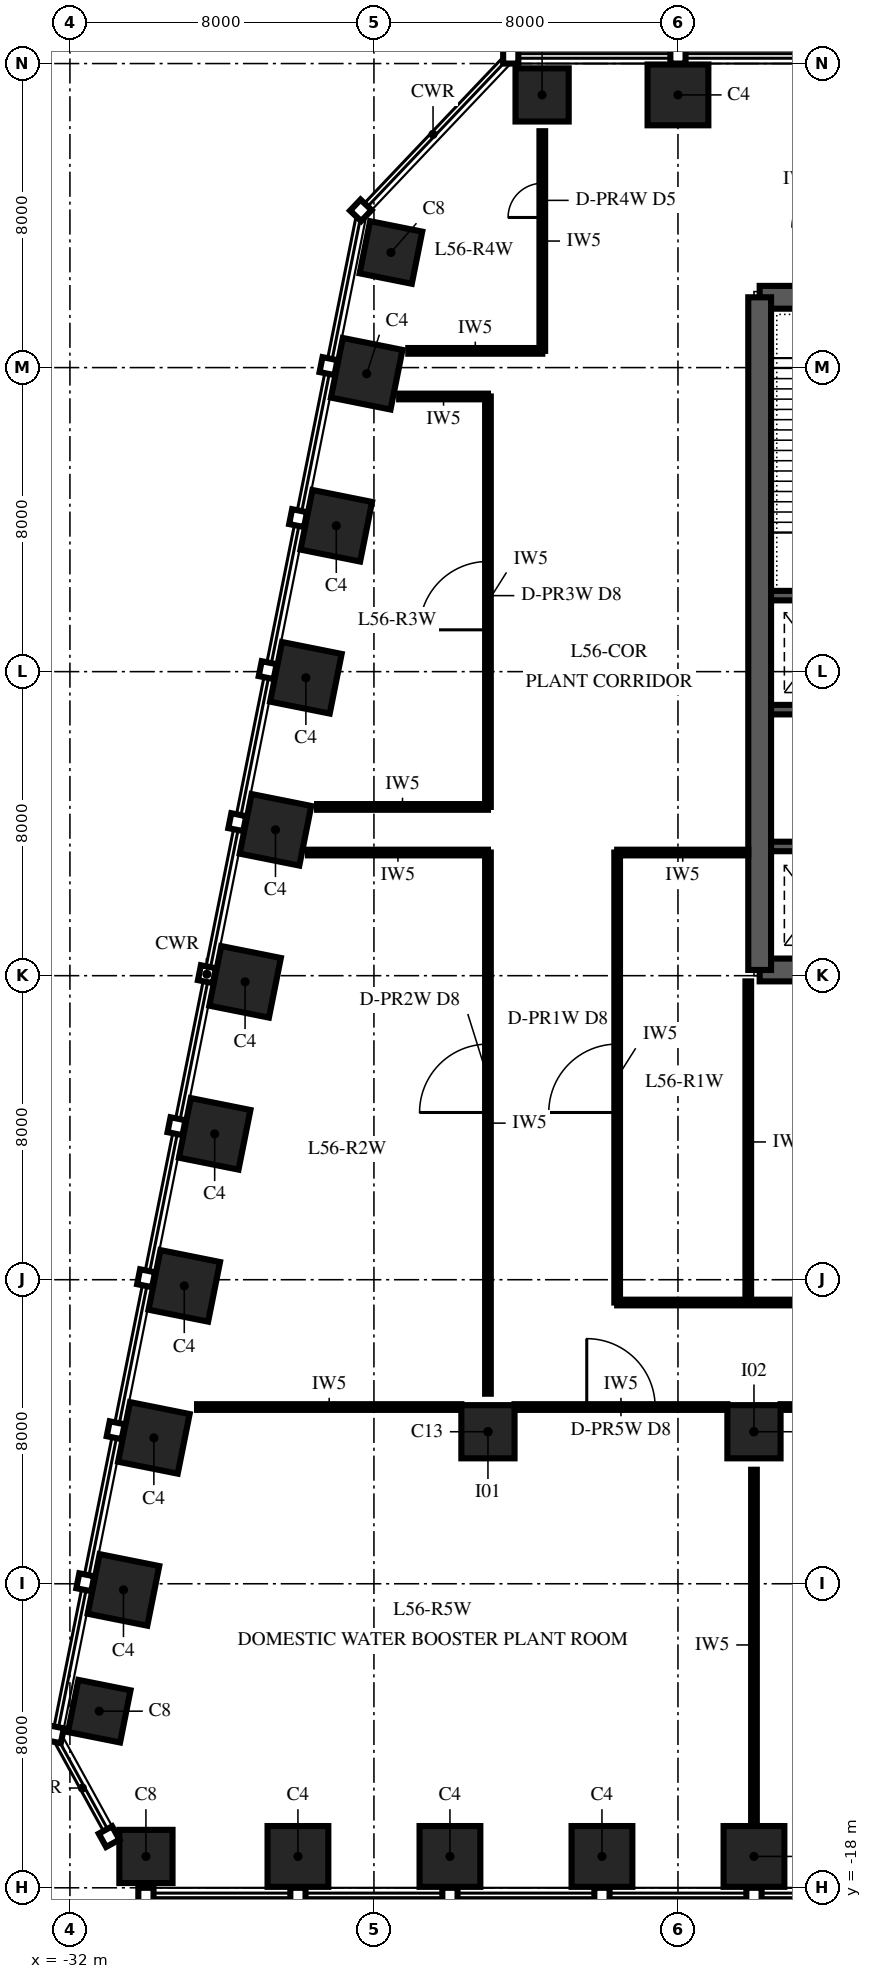
"""IFC4 building model, lengths in metres.
Left out: names, types, materials, properties, quantities, classifications, styles, units other than length and angle.
Written with IfcOpenShell. Run it as: python <this file> out.ifc"""

import sys

from ifc_helpers import new_model, si_unit, direction, frame, frame_2d, origin, origin_2d, place, context, subcontext, project, spatial, polyline, rectangle, outline, extrude, element, fill, save


model = new_model("IFC4")
c1 = context("Model", 3, precision=1e-05, world=origin(), true_north=direction((0.0, 1.0)))
c2 = subcontext(c1, "Body", "Model", "MODEL_VIEW")
j1 = project(units=[si_unit("LENGTHUNIT", "METRE"), si_unit("PLANEANGLEUNIT", "RADIAN")], contexts=[c1])
p1 = place(None, origin())
s1 = spatial("IfcSite", under=j1, at=p1, CompositionType="ELEMENT")
p2 = place(p1, origin())
s2 = spatial("IfcBuilding", under=s1, at=p2, CompositionType="ELEMENT")
p3 = place(p2, frame((0.0, 0.0, 242.0)))
s3 = spatial("IfcBuildingStorey", under=s2, at=p3, CompositionType="ELEMENT", Elevation=242.0)
p4 = place(p3, frame((-30.0, -17.175, 0.0), z_axis=(0.0, 0.0, 1.0), x_axis=(1.0, 0.0, 0.0)))
e1 = element("IfcColumn", 1, at=p4, inside=s3, PredefinedType="COLUMN", context=c2, shape_type="SweptSolid", body=[
    extrude(rectangle(XDim=1.4, YDim=1.4, at=origin_2d()), origin(), (0.0, 0.0, 1.0), 6.0),
])
for number, where, z_axis, x_axis in (
    (2, (-26.0, -17.175, 0.0), (0.0, 0.0, 1.0), (1.0, 0.0, 0.0)),
    (3, (-22.0, -17.175, 0.0), (0.0, 0.0, 1.0), (1.0, 0.0, 0.0)),
    (4, (-18.0, -17.175, 0.0), (0.0, 0.0, 1.0), (1.0, 0.0, 0.0)),
    (5, (-14.0, -17.175, 0.0), (0.0, 0.0, 1.0), (1.0, 0.0, 0.0)),
    (6, (-16.0, 29.175, 0.0), (0.0, 0.0, 1.0), (-1.0, 0.0, 0.0)),
):
    element("IfcColumn", number, at=place(p3, frame(where, z_axis=z_axis, x_axis=x_axis)), inside=s3, PredefinedType="COLUMN", context=c2, shape_type="SweptSolid", body=[
        extrude(rectangle(XDim=1.6, YDim=1.6, at=origin_2d()), origin(), (0.0, 0.0, 1.0), 6.0),
    ])
for number, where, z_axis, x_axis in (
    (7, (-19.575, 29.175, 0.0), (0.0, 0.0, 1.0), (-1.0, 0.0, 0.0)),
    (8, (-23.553, 25.029, 0.0), (0.0, 0.0, 1.0), (-0.196, -0.981, 0.0)),
):
    element("IfcColumn", number, at=place(p3, frame(where, z_axis=z_axis, x_axis=x_axis)), inside=s3, PredefinedType="COLUMN", context=c2, shape_type="SweptSolid", body=[
        extrude(rectangle(XDim=1.4, YDim=1.4, at=origin_2d()), origin(), (0.0, 0.0, 1.0), 6.0),
    ])
for number, where, z_axis, x_axis in (
    (9, (-24.191, 21.838, 0.0), (0.0, 0.0, 1.0), (-0.196, -0.981, 0.0)),
    (10, (-24.991, 17.838, 0.0), (0.0, 0.0, 1.0), (-0.196, -0.981, 0.0)),
    (11, (-25.791, 13.838, 0.0), (0.0, 0.0, 1.0), (-0.196, -0.981, 0.0)),
    (12, (-26.591, 9.838, 0.0), (0.0, 0.0, 1.0), (-0.196, -0.981, 0.0)),
    (13, (-27.391, 5.838, 0.0), (0.0, 0.0, 1.0), (-0.196, -0.981, 0.0)),
    (14, (-28.191, 1.838, 0.0), (0.0, 0.0, 1.0), (-0.196, -0.981, 0.0)),
    (15, (-28.991, -2.162, 0.0), (0.0, 0.0, 1.0), (-0.196, -0.981, 0.0)),
    (16, (-29.791, -6.162, 0.0), (0.0, 0.0, 1.0), (-0.196, -0.981, 0.0)),
    (17, (-30.591, -10.162, 0.0), (0.0, 0.0, 1.0), (-0.196, -0.981, 0.0)),
):
    element("IfcColumn", number, at=place(p3, frame(where, z_axis=z_axis, x_axis=x_axis)), inside=s3, PredefinedType="COLUMN", context=c2, shape_type="SweptSolid", body=[
        extrude(rectangle(XDim=1.6, YDim=1.6, at=origin_2d()), origin(), (0.0, 0.0, 1.0), 6.0),
    ])
for number, where, z_axis, x_axis in (
    (18, (-31.229, -13.353, 0.0), (0.0, 0.0, 1.0), (-0.196, -0.981, 0.0)),
    (19, (-21.0, -6.0, 0.0), (0.0, 0.0, 1.0), (1.0, 0.0, 0.0)),
    (20, (-14.0, -6.0, 0.0), (0.0, 0.0, 1.0), (1.0, 0.0, 0.0)),
):
    element("IfcColumn", number, at=place(p3, frame(where, z_axis=z_axis, x_axis=x_axis)), inside=s3, PredefinedType="COLUMN", context=c2, shape_type="SweptSolid", body=[
        extrude(rectangle(XDim=1.4, YDim=1.4, at=origin_2d()), origin(), (0.0, 0.0, 1.0), 6.0),
    ])
p5 = place(p3, frame((-13.85, 6.15, 0.0), z_axis=(0.0, 0.0, 1.0), x_axis=(1.0, 0.0, 0.0)))
e21 = element("IfcWall", 21, at=p5, inside=s3, PredefinedType="SHEAR", context=c2, shape_type="SweptSolid", body=[
    extrude(rectangle(XDim=27.7, YDim=0.6, at=frame_2d((13.85, 0.0))), origin(), (0.0, 0.0, 1.0), 6.0),
])
p6 = place(p3, frame((13.85, 23.85, 0.0), z_axis=(0.0, 0.0, 1.0), x_axis=(-1.0, 0.0, 0.0)))
e22 = element("IfcWall", 22, at=p6, inside=s3, PredefinedType="SHEAR", context=c2, shape_type="SweptSolid", body=[
    extrude(rectangle(XDim=27.7, YDim=0.6, at=frame_2d((13.85, 0.0))), origin(), (0.0, 0.0, 1.0), 6.0),
])
p7 = place(p6, frame((21.75, 0.0, 0.0)))
e23 = element("IfcOpeningElement", 23, at=p7, cuts=e22, PredefinedType="OPENING", context=c2, shape_type="SweptSolid", body=[
    extrude(rectangle(XDim=1.0, YDim=2.1, at=frame_2d((0.5, 1.05))), frame((0.0, 0.315, 0.0), z_axis=(0.0, -1.0, 0.0), x_axis=(1.0, 0.0, 0.0)), (0.0, 0.0, 1.0), 0.63),
])
p8 = place(p6, frame((4.95, 0.0, 0.0)))
e24 = element("IfcOpeningElement", 24, at=p8, cuts=e22, PredefinedType="OPENING", context=c2, shape_type="SweptSolid", body=[
    extrude(rectangle(XDim=1.0, YDim=2.1, at=frame_2d((0.5, 1.05))), frame((0.0, 0.315, 0.0), z_axis=(0.0, -1.0, 0.0), x_axis=(1.0, 0.0, 0.0)), (0.0, 0.0, 1.0), 0.63),
])
p9 = place(p6, frame((17.35, 0.0, 0.0)))
e25 = element("IfcOpeningElement", 25, at=p9, cuts=e22, PredefinedType="OPENING", context=c2, shape_type="SweptSolid", body=[
    extrude(rectangle(XDim=1.0, YDim=2.1, at=frame_2d((0.5, 1.05))), frame((0.0, 0.315, 0.0), z_axis=(0.0, -1.0, 0.0), x_axis=(1.0, 0.0, 0.0)), (0.0, 0.0, 1.0), 0.63),
])
p10 = place(p6, frame((13.35, 0.0, 0.0)))
e26 = element("IfcOpeningElement", 26, at=p10, cuts=e22, PredefinedType="OPENING", context=c2, shape_type="SweptSolid", body=[
    extrude(rectangle(XDim=1.0, YDim=2.1, at=frame_2d((0.5, 1.05))), frame((0.0, 0.315, 0.0), z_axis=(0.0, -1.0, 0.0), x_axis=(1.0, 0.0, 0.0)), (0.0, 0.0, 1.0), 0.63),
])
p11 = place(p6, frame((9.35, 0.0, 0.0)))
e27 = element("IfcOpeningElement", 27, at=p11, cuts=e22, PredefinedType="OPENING", context=c2, shape_type="SweptSolid", body=[
    extrude(rectangle(XDim=1.0, YDim=2.1, at=frame_2d((0.5, 1.05))), frame((0.0, 0.315, 0.0), z_axis=(0.0, -1.0, 0.0), x_axis=(1.0, 0.0, 0.0)), (0.0, 0.0, 1.0), 0.63),
])
p12 = place(p3, frame((-13.85, 23.85, 0.0), z_axis=(0.0, 0.0, 1.0), x_axis=(0.0, -1.0, 0.0)))
e28 = element("IfcWall", 28, at=p12, inside=s3, PredefinedType="SHEAR", context=c2, shape_type="SweptSolid", body=[
    extrude(outline(polyline([(0.0, -0.3), (17.7, -0.3), (17.7, 0.0), (17.4, 0.0), (17.4, 0.3), (0.3, 0.3), (0.3, 0.0), (0.0, 0.0), (0.0, -0.3)])), origin(), (0.0, 0.0, 1.0), 6.0),
])
for number, where, z_axis, x_axis in (
    (29, (-13.55, 9.4, 0.0), (0.0, 0.0, 1.0), (1.0, 0.0, 0.0)),
    (30, (-13.55, 13.0, 0.0), (0.0, 0.0, 1.0), (1.0, 0.0, 0.0)),
    (31, (-13.55, 16.0, 0.0), (0.0, 0.0, 1.0), (1.0, 0.0, 0.0)),
):
    element("IfcWall", number, at=place(p3, frame(where, z_axis=z_axis, x_axis=x_axis)), inside=s3, PredefinedType="SHEAR", context=c2, shape_type="SweptSolid", body=[
        extrude(rectangle(XDim=27.1, YDim=0.25, at=frame_2d((13.55, 0.0))), origin(), (0.0, 0.0, 1.0), 6.0),
    ])
p13 = place(p3, frame((-17.6, -2.6, 0.0), z_axis=(0.0, 0.0, 1.0), x_axis=(0.0, 1.0, 0.0)))
e32 = element("IfcWall", 32, at=p13, inside=s3, PredefinedType="PARTITIONING", context=c2, shape_type="SweptSolid", body=[
    extrude(rectangle(XDim=11.84, YDim=0.15, at=frame_2d((5.92, 0.0))), origin(), (0.0, 0.0, 1.0), 5.85),
])
p14 = place(p13, frame((5.0, 0.0, 0.0)))
e33 = element("IfcOpeningElement", 33, at=p14, cuts=e32, PredefinedType="OPENING", context=c2, shape_type="SweptSolid", body=[
    extrude(rectangle(XDim=1.8, YDim=2.4, at=frame_2d((0.9, 1.2))), frame((0.0, 0.09, 0.0), z_axis=(0.0, -1.0, 0.0), x_axis=(1.0, 0.0, 0.0)), (0.0, 0.0, 1.0), 0.18),
])
p15 = place(p3, frame((-21.0, -5.0, 0.0), z_axis=(0.0, 0.0, 1.0), x_axis=(0.0, 1.0, 0.0)))
e34 = element("IfcWall", 34, at=p15, inside=s3, PredefinedType="PARTITIONING", context=c2, shape_type="SweptSolid", body=[
    extrude(rectangle(XDim=14.24, YDim=0.15, at=frame_2d((7.12, 0.0))), origin(), (0.0, 0.0, 1.0), 5.85),
])
p16 = place(p15, frame((7.4, 0.0, 0.0)))
e35 = element("IfcOpeningElement", 35, at=p16, cuts=e34, PredefinedType="OPENING", context=c2, shape_type="SweptSolid", body=[
    extrude(rectangle(XDim=1.8, YDim=2.4, at=frame_2d((0.9, 1.2))), frame((0.0, 0.09, 0.0), z_axis=(0.0, -1.0, 0.0), x_axis=(1.0, 0.0, 0.0)), (0.0, 0.0, 1.0), 0.18),
])
p17 = place(p3, frame((-21.0, 10.44, 0.0), z_axis=(0.0, 0.0, 1.0), x_axis=(0.0, 1.0, 0.0)))
e36 = element("IfcWall", 36, at=p17, inside=s3, PredefinedType="PARTITIONING", context=c2, shape_type="SweptSolid", body=[
    extrude(rectangle(XDim=10.8, YDim=0.15, at=frame_2d((5.4, 0.0))), origin(), (0.0, 0.0, 1.0), 5.85),
])
p18 = place(p17, frame((4.66, 0.0, 0.0)))
e37 = element("IfcOpeningElement", 37, at=p18, cuts=e36, PredefinedType="OPENING", context=c2, shape_type="SweptSolid", body=[
    extrude(rectangle(XDim=1.8, YDim=2.4, at=frame_2d((0.9, 1.2))), frame((0.0, 0.09, 0.0), z_axis=(0.0, -1.0, 0.0), x_axis=(1.0, 0.0, 0.0)), (0.0, 0.0, 1.0), 0.18),
])
p19 = place(p3, frame((-14.15, -2.6, 0.0), z_axis=(0.0, 0.0, 1.0), x_axis=(0.0, 1.0, 0.0)))
e38 = element("IfcWall", 38, at=p19, inside=s3, PredefinedType="PARTITIONING", context=c2, shape_type="SweptSolid", body=[
    extrude(rectangle(XDim=8.45, YDim=0.15, at=frame_2d((4.225, 0.0))), origin(), (0.0, 0.0, 1.0), 5.85),
])
p20 = place(p3, frame((-14.15, 9.24, 0.0), z_axis=(0.0, 0.0, 1.0), x_axis=(-1.0, 0.0, 0.0)))
e39 = element("IfcWall", 39, at=p20, inside=s3, PredefinedType="PARTITIONING", context=c2, shape_type="SweptSolid", body=[
    extrude(rectangle(XDim=3.45, YDim=0.15, at=frame_2d((1.725, 0.0))), origin(), (0.0, 0.0, 1.0), 5.25),
])
p21 = place(p3, frame((-21.0, 9.24, 0.0), z_axis=(0.0, 0.0, 1.0), x_axis=(-1.0, 0.0, 0.0)))
e40 = element("IfcWall", 40, at=p21, inside=s3, PredefinedType="PARTITIONING", context=c2, shape_type="SweptSolid", body=[
    extrude(rectangle(XDim=4.737, YDim=0.15, at=frame_2d((2.368, 0.0))), origin(), (0.0, 0.0, 1.0), 5.85),
])
p22 = place(p3, frame((-21.0, 10.44, 0.0), z_axis=(0.0, 0.0, 1.0), x_axis=(-1.0, 0.0, 0.0)))
e41 = element("IfcWall", 41, at=p22, inside=s3, PredefinedType="PARTITIONING", context=c2, shape_type="SweptSolid", body=[
    extrude(rectangle(XDim=4.497, YDim=0.15, at=frame_2d((2.248, 0.0))), origin(), (0.0, 0.0, 1.0), 5.85),
])
p23 = place(p3, frame((-21.0, 21.24, 0.0), z_axis=(0.0, 0.0, 1.0), x_axis=(-1.0, 0.0, 0.0)))
e42 = element("IfcWall", 42, at=p23, inside=s3, PredefinedType="PARTITIONING", context=c2, shape_type="SweptSolid", body=[
    extrude(rectangle(XDim=2.337, YDim=0.15, at=frame_2d((1.168, 0.0))), origin(), (0.0, 0.0, 1.0), 5.85),
])
p24 = place(p3, frame((-19.57, 22.44, 0.0), z_axis=(0.0, 0.0, 1.0), x_axis=(-1.0, 0.0, 0.0)))
e43 = element("IfcWall", 43, at=p24, inside=s3, PredefinedType="PARTITIONING", context=c2, shape_type="SweptSolid", body=[
    extrude(rectangle(XDim=3.527, YDim=0.15, at=frame_2d((1.763, 0.0))), origin(), (0.0, 0.0, 1.0), 5.85),
])
p25 = place(p3, frame((-19.57, 22.44, 0.0), z_axis=(0.0, 0.0, 1.0), x_axis=(0.0, 1.0, 0.0)))
e44 = element("IfcWall", 44, at=p25, inside=s3, PredefinedType="PARTITIONING", context=c2, shape_type="SweptSolid", body=[
    extrude(rectangle(XDim=5.78, YDim=0.15, at=frame_2d((2.89, 0.0))), origin(), (0.0, 0.0, 1.0), 5.4),
])
p26 = place(p25, frame((3.51, 0.0, 0.0)))
e45 = element("IfcOpeningElement", 45, at=p26, cuts=e44, PredefinedType="OPENING", context=c2, shape_type="SweptSolid", body=[
    extrude(rectangle(XDim=0.9, YDim=2.1, at=frame_2d((0.45, 1.05))), frame((0.0, 0.09, 0.0), z_axis=(0.0, -1.0, 0.0), x_axis=(1.0, 0.0, 0.0)), (0.0, 0.0, 1.0), 0.18),
])
p27 = place(p3, frame((-14.0, -7.0, 0.0), z_axis=(0.0, 0.0, 1.0), x_axis=(0.0, -1.0, 0.0)))
e46 = element("IfcWall", 46, at=p27, inside=s3, PredefinedType="PARTITIONING", context=c2, shape_type="SweptSolid", body=[
    extrude(rectangle(XDim=9.22, YDim=0.15, at=frame_2d((4.61, 0.0))), origin(), (0.0, 0.0, 1.0), 5.25),
])
p28 = place(p3, frame((-28.655, -5.35, 0.0), z_axis=(0.0, 0.0, 1.0), x_axis=(1.0, 0.0, 0.0)))
e47 = element("IfcWall", 47, at=p28, inside=s3, PredefinedType="PARTITIONING", context=c2, shape_type="SweptSolid", body=[
    extrude(rectangle(XDim=6.955, YDim=0.15, at=frame_2d((3.478, 0.0))), origin(), (0.0, 0.0, 1.0), 5.85),
])
p29 = place(p3, frame((-20.3, -5.35, 0.0), z_axis=(0.0, 0.0, 1.0), x_axis=(1.0, 0.0, 0.0)))
e48 = element("IfcWall", 48, at=p29, inside=s3, PredefinedType="PARTITIONING", context=c2, shape_type="SweptSolid", body=[
    extrude(rectangle(XDim=5.6, YDim=0.15, at=frame_2d((2.8, 0.0))), origin(), (0.0, 0.0, 1.0), 5.85),
])
p30 = place(p29, frame((1.9, 0.0, 0.0)))
e49 = element("IfcOpeningElement", 49, at=p30, cuts=e48, PredefinedType="OPENING", context=c2, shape_type="SweptSolid", body=[
    extrude(rectangle(XDim=1.8, YDim=2.4, at=frame_2d((0.9, 1.2))), frame((0.0, 0.09, 0.0), z_axis=(0.0, -1.0, 0.0), x_axis=(1.0, 0.0, 0.0)), (0.0, 0.0, 1.0), 0.18),
])
p31 = place(p3, frame((-13.3, -5.35, 0.0), z_axis=(0.0, 0.0, 1.0), x_axis=(1.0, 0.0, 0.0)))
e50 = element("IfcWall", 50, at=p31, inside=s3, PredefinedType="PARTITIONING", context=c2, shape_type="SweptSolid", body=[
    extrude(rectangle(XDim=5.6, YDim=0.15, at=frame_2d((2.8, 0.0))), origin(), (0.0, 0.0, 1.0), 5.85),
])
p32 = place(p3, frame((-17.6, -2.6, 0.0), z_axis=(0.0, 0.0, 1.0), x_axis=(1.0, 0.0, 0.0)))
e51 = element("IfcWall", 51, at=p32, inside=s3, PredefinedType="PARTITIONING", context=c2, shape_type="SweptSolid", body=[
    extrude(rectangle(XDim=35.2, YDim=0.15, at=frame_2d((17.6, 0.0))), origin(), (0.0, 0.0, 1.0), 5.85),
])
p33 = place(p32, frame((13.7, 0.0, 0.0)))
e52 = element("IfcOpeningElement", 52, at=p33, cuts=e51, PredefinedType="OPENING", context=c2, shape_type="SweptSolid", body=[
    extrude(rectangle(XDim=1.8, YDim=2.4, at=frame_2d((0.9, 1.2))), frame((0.0, 0.09, 0.0), z_axis=(0.0, -1.0, 0.0), x_axis=(1.0, 0.0, 0.0)), (0.0, 0.0, 1.0), 0.18),
])
p34 = place(p14, origin())
e53 = element("IfcDoor", 53, at=p34, inside=s3, OperationType="DOUBLE_DOOR_SINGLE_SWING", PredefinedType="DOOR", context=c2, shape_type="SweptSolid", body=[
    extrude(rectangle(XDim=1.8, YDim=2.4, at=frame_2d((0.9, 1.2))), frame((0.0, 0.075, 0.0), z_axis=(0.0, -1.0, 0.0), x_axis=(1.0, 0.0, 0.0)), (0.0, 0.0, 1.0), 0.149),
])
fill(e33, e53)
p35 = place(p16, origin())
e54 = element("IfcDoor", 54, at=p35, inside=s3, OperationType="DOUBLE_DOOR_SINGLE_SWING", PredefinedType="DOOR", context=c2, shape_type="SweptSolid", body=[
    extrude(rectangle(XDim=1.8, YDim=2.4, at=frame_2d((0.9, 1.2))), frame((0.0, 0.075, 0.0), z_axis=(0.0, -1.0, 0.0), x_axis=(1.0, 0.0, 0.0)), (0.0, 0.0, 1.0), 0.149),
])
fill(e35, e54)
p36 = place(p18, origin())
e55 = element("IfcDoor", 55, at=p36, inside=s3, OperationType="DOUBLE_DOOR_SINGLE_SWING", PredefinedType="DOOR", context=c2, shape_type="SweptSolid", body=[
    extrude(rectangle(XDim=1.8, YDim=2.4, at=frame_2d((0.9, 1.2))), frame((0.0, 0.075, 0.0), z_axis=(0.0, -1.0, 0.0), x_axis=(1.0, 0.0, 0.0)), (0.0, 0.0, 1.0), 0.149),
])
fill(e37, e55)
p37 = place(p26, origin())
e56 = element("IfcDoor", 56, at=p37, inside=s3, OperationType="SINGLE_SWING_LEFT", PredefinedType="DOOR", context=c2, shape_type="SweptSolid", body=[
    extrude(rectangle(XDim=0.9, YDim=2.1, at=frame_2d((0.45, 1.05))), frame((0.0, 0.075, 0.0), z_axis=(0.0, -1.0, 0.0), x_axis=(1.0, 0.0, 0.0)), (0.0, 0.0, 1.0), 0.149),
])
fill(e45, e56)
p38 = place(p30, origin())
e57 = element("IfcDoor", 57, at=p38, inside=s3, OperationType="DOUBLE_DOOR_SINGLE_SWING", PredefinedType="DOOR", context=c2, shape_type="SweptSolid", body=[
    extrude(rectangle(XDim=1.8, YDim=2.4, at=frame_2d((0.9, 1.2))), frame((0.0, 0.075, 0.0), z_axis=(0.0, -1.0, 0.0), x_axis=(1.0, 0.0, 0.0)), (0.0, 0.0, 1.0), 0.149),
])
fill(e49, e57)
save(model, sys.argv[1])
